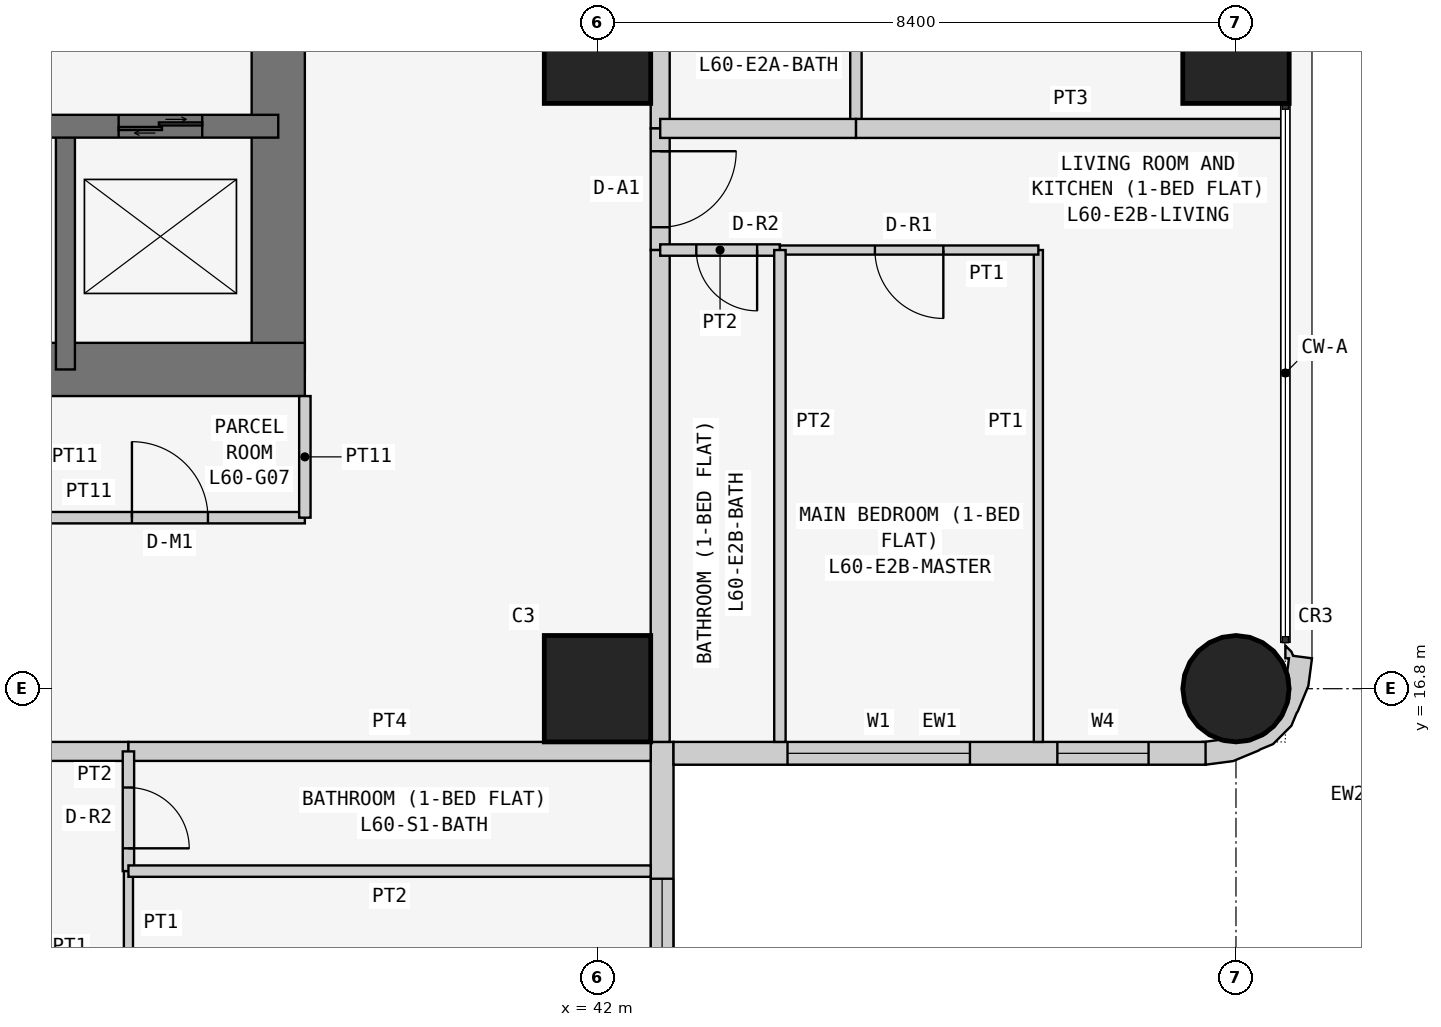
"""IFC4 building model, lengths in metres.
Left out: names, types, materials, properties, quantities, classifications, styles, units other than length and angle.
Written with IfcOpenShell. Run it as: python <this file> out.ifc"""

import sys

from ifc_helpers import new_model, si_unit, direction, frame, frame_2d, origin, origin_2d, place, context, subcontext, project, spatial, polyline, rectangle, circle, outline, extrude, element, fill, save


model = new_model("IFC4")
c1 = context("Model", 3, precision=1e-05, world=origin(), true_north=direction((0.0, 1.0)))
c2 = subcontext(c1, "Body", "Model", "MODEL_VIEW")
j1 = project(units=[si_unit("LENGTHUNIT", "METRE"), si_unit("PLANEANGLEUNIT", "RADIAN")], contexts=[c1])
p1 = place(None, origin())
s1 = spatial("IfcSite", under=j1, at=p1, CompositionType="ELEMENT")
p2 = place(p1, origin())
s2 = spatial("IfcBuilding", under=s1, at=p2, CompositionType="ELEMENT")
p3 = place(p2, frame((0.0, 0.0, 230.1)))
s3 = spatial("IfcBuildingStorey", under=s2, at=p3, CompositionType="ELEMENT", Elevation=230.1)
for number, where, z_axis, x_axis in (
    (1, (42.0, 16.8, 0.0), (0.0, 0.0, 1.0), (1.0, 0.0, 0.0)),
    (2, (42.0, 25.2, 0.0), (0.0, 0.0, 1.0), (1.0, 0.0, 0.0)),
):
    element("IfcColumn", number, at=place(p3, frame(where, z_axis=z_axis, x_axis=x_axis)), inside=s3, PredefinedType="COLUMN", context=c2, shape_type="SweptSolid", body=[
        extrude(rectangle(XDim=1.4, YDim=1.4, at=origin_2d()), origin(), (0.0, 0.0, 1.0), 3.6),
    ])
p4 = place(p3, frame((50.4, 16.8, 0.0), z_axis=(0.0, 0.0, 1.0), x_axis=(1.0, 0.0, 0.0)))
e3 = element("IfcColumn", 3, at=p4, inside=s3, PredefinedType="COLUMN", context=c2, shape_type="SweptSolid", body=[
    extrude(circle(Radius=0.7, at=origin_2d()), origin(), (0.0, 0.0, 1.0), 3.6),
])
p5 = place(p3, frame((50.4, 25.2, 0.0), z_axis=(0.0, 0.0, 1.0), x_axis=(1.0, 0.0, 0.0)))
e4 = element("IfcColumn", 4, at=p5, inside=s3, PredefinedType="COLUMN", context=c2, shape_type="SweptSolid", body=[
    extrude(rectangle(XDim=1.4, YDim=1.4, at=origin_2d()), origin(), (0.0, 0.0, 1.0), 3.6),
])
p6 = place(p3, frame((21.0, 21.0, 0.0), z_axis=(0.0, 0.0, 1.0), x_axis=(1.0, 0.0, 0.0)))
e5 = element("IfcWall", 5, at=p6, inside=s3, PredefinedType="SHEAR", context=c2, shape_type="SweptSolid", body=[
    extrude(rectangle(XDim=17.15, YDim=0.7, at=frame_2d((8.575, 0.0))), origin(), (0.0, 0.0, 1.0), 3.6),
])
p7 = place(p3, frame((37.8, 21.0, 0.0), z_axis=(0.0, 0.0, 1.0), x_axis=(0.0, 1.0, 0.0)))
e6 = element("IfcWall", 6, at=p7, inside=s3, PredefinedType="SHEAR", context=c2, shape_type="SweptSolid", body=[
    extrude(rectangle(XDim=17.15, YDim=0.7, at=frame_2d((8.575, 0.0))), origin(), (0.0, 0.0, 1.0), 3.6),
])
p8 = place(p7, frame((5.2, 0.0, 0.0)))
e7 = element("IfcOpeningElement", 7, at=p8, cuts=e6, PredefinedType="OPENING", context=c2, shape_type="SweptSolid", body=[
    extrude(rectangle(XDim=1.2, YDim=2.1, at=frame_2d((0.6, 1.05))), frame((0.0, 0.36, 0.0), z_axis=(0.0, -1.0, 0.0), x_axis=(1.0, 0.0, 0.0)), (0.0, 0.0, 1.0), 0.72),
])
p9 = place(p3, frame((26.6, 24.2, 0.0), z_axis=(0.0, 0.0, 1.0), x_axis=(1.0, 0.0, 0.0)))
e8 = element("IfcWall", 8, at=p9, inside=s3, PredefinedType="SHEAR", context=c2, shape_type="SweptSolid", body=[
    extrude(rectangle(XDim=11.2, YDim=0.3, at=frame_2d((5.6, 0.0))), origin(), (0.0, 0.0, 1.0), 3.6),
])
p10 = place(p9, frame((0.913, 0.0, 0.0)))
e9 = element("IfcOpeningElement", 9, at=p10, cuts=e8, PredefinedType="OPENING", context=c2, shape_type="SweptSolid", body=[
    extrude(rectangle(XDim=1.0, YDim=2.1, at=frame_2d((0.5, 1.05))), frame((0.0, 0.16, 0.0), z_axis=(0.0, -1.0, 0.0), x_axis=(1.0, 0.0, 0.0)), (0.0, 0.0, 1.0), 0.32),
])
p11 = place(p9, frame((3.75, 0.0, 0.0)))
e10 = element("IfcOpeningElement", 10, at=p11, cuts=e8, PredefinedType="OPENING", context=c2, shape_type="SweptSolid", body=[
    extrude(rectangle(XDim=0.9, YDim=2.1, at=frame_2d((0.45, 1.05))), frame((0.0, 0.16, 0.0), z_axis=(0.0, -1.0, 0.0), x_axis=(1.0, 0.0, 0.0)), (0.0, 0.0, 1.0), 0.32),
])
p12 = place(p9, frame((6.45, 0.0, 0.0)))
e11 = element("IfcOpeningElement", 11, at=p12, cuts=e8, PredefinedType="OPENING", context=c2, shape_type="SweptSolid", body=[
    extrude(rectangle(XDim=1.1, YDim=2.1, at=frame_2d((0.55, 1.05))), frame((0.0, 0.16, 0.0), z_axis=(0.0, -1.0, 0.0), x_axis=(1.0, 0.0, 0.0)), (0.0, 0.0, 1.0), 0.32),
])
p13 = place(p9, frame((9.1, 0.0, 0.0)))
e12 = element("IfcOpeningElement", 12, at=p13, cuts=e8, PredefinedType="OPENING", context=c2, shape_type="SweptSolid", body=[
    extrude(rectangle(XDim=1.1, YDim=2.1, at=frame_2d((0.55, 1.05))), frame((0.0, 0.16, 0.0), z_axis=(0.0, -1.0, 0.0), x_axis=(1.0, 0.0, 0.0)), (0.0, 0.0, 1.0), 0.32),
])
p14 = place(p3, frame((35.0, 21.0, 0.0), z_axis=(0.0, 0.0, 1.0), x_axis=(0.0, 1.0, 0.0)))
e13 = element("IfcWall", 13, at=p14, inside=s3, PredefinedType="SHEAR", context=c2, shape_type="SweptSolid", body=[
    extrude(rectangle(XDim=3.2, YDim=0.25, at=frame_2d((1.6, 0.0))), origin(), (0.0, 0.0, 1.0), 3.6),
])
p15 = place(p3, frame((42.85, 8.8, 0.0), z_axis=(0.0, 0.0, 1.0), x_axis=(0.0, 1.0, 0.0)))
e14 = element("IfcWall", 14, at=p15, inside=s3, PredefinedType="SOLIDWALL", context=c2, shape_type="SweptSolid", body=[
    extrude(rectangle(XDim=7.3, YDim=0.3, at=frame_2d((3.65, 0.0))), origin(), (0.0, 0.0, 1.0), 3.45),
])
p16 = place(p15, frame((3.1, 0.0, 0.9)))
e15 = element("IfcOpeningElement", 15, at=p16, cuts=e14, PredefinedType="OPENING", context=c2, shape_type="SweptSolid", body=[
    extrude(rectangle(XDim=2.4, YDim=1.5, at=frame_2d((1.2, 0.75))), frame((0.0, 0.16, 0.0), z_axis=(0.0, -1.0, 0.0), x_axis=(1.0, 0.0, 0.0)), (0.0, 0.0, 1.0), 0.32),
])
p17 = place(p15, frame((0.75, 0.0, 0.9)))
e16 = element("IfcOpeningElement", 16, at=p17, cuts=e14, PredefinedType="OPENING", context=c2, shape_type="SweptSolid", body=[
    extrude(rectangle(XDim=1.2, YDim=1.5, at=frame_2d((0.6, 0.75))), frame((0.0, 0.16, 0.0), z_axis=(0.0, -1.0, 0.0), x_axis=(1.0, 0.0, 0.0)), (0.0, 0.0, 1.0), 0.32),
])
p18 = place(p3, frame((43.0, 15.95, 0.0), z_axis=(0.0, 0.0, 1.0), x_axis=(1.0, 0.0, 0.0)))
e17 = element("IfcWall", 17, at=p18, inside=s3, PredefinedType="SOLIDWALL", context=c2, shape_type="SweptSolid", body=[
    extrude(rectangle(XDim=7.0, YDim=0.3, at=frame_2d((3.5, 0.0))), origin(), (0.0, 0.0, 1.0), 3.45),
])
p19 = place(p18, frame((1.5, 0.0, 0.9)))
e18 = element("IfcOpeningElement", 18, at=p19, cuts=e17, PredefinedType="OPENING", context=c2, shape_type="SweptSolid", body=[
    extrude(rectangle(XDim=2.4, YDim=1.5, at=frame_2d((1.2, 0.75))), frame((0.0, 0.16, 0.0), z_axis=(0.0, -1.0, 0.0), x_axis=(1.0, 0.0, 0.0)), (0.0, 0.0, 1.0), 0.32),
])
p20 = place(p18, frame((5.05, 0.0, 0.9)))
e19 = element("IfcOpeningElement", 19, at=p20, cuts=e17, PredefinedType="OPENING", context=c2, shape_type="SweptSolid", body=[
    extrude(rectangle(XDim=1.2, YDim=1.5, at=frame_2d((0.6, 0.75))), frame((0.0, 0.16, 0.0), z_axis=(0.0, -1.0, 0.0), x_axis=(1.0, 0.0, 0.0)), (0.0, 0.0, 1.0), 0.32),
])
p21 = place(p3, frame((50.11, 16.076, 0.0), z_axis=(0.0, 0.0, 1.0), x_axis=(0.898030234854, -0.439933741929, 0.0)))
e20 = element("IfcWall", 20, at=p21, inside=s3, PredefinedType="SOLIDWALL", context=c2, shape_type="SweptSolid", body=[
    extrude(outline(polyline([(0.664, 1.577), (0.426, 1.497), (0.382, 1.536), (0.276, 1.572), (0.349, 1.423), (0.392, 1.444), (0.453, 1.261), (0.51, 1.211), (0.632, 0.961), (0.65, 0.683), (0.56, 0.419), (0.375, 0.21), (0.125, 0.087), (0.05, 0.082), (-0.128, -0.035), (-0.145, -0.044), (0.022, -0.296), (0.327, -0.094), (0.568, 0.18), (0.577, 0.199), (0.7, 0.337), (0.811, 0.661), (0.799, 0.846), (0.803, 0.866), (0.78, 1.231), (0.664, 1.577)])), origin(), (0.0, 0.0, 1.0), 3.45),
])
p22 = place(p3, frame((34.6, 19.05, 0.0), z_axis=(0.0, 0.0, 1.0), x_axis=(1.0, 0.0, 0.0)))
e21 = element("IfcWall", 21, at=p22, inside=s3, PredefinedType="PARTITIONING", context=c2, shape_type="SweptSolid", body=[
    extrude(rectangle(XDim=3.55, YDim=0.15, at=frame_2d((1.775, 0.0))), origin(), (0.0, 0.0, 1.0), 3.45),
])
p23 = place(p22, frame((1.275, 0.0, 0.0)))
e22 = element("IfcOpeningElement", 22, at=p23, cuts=e21, PredefinedType="OPENING", context=c2, shape_type="SweptSolid", body=[
    extrude(rectangle(XDim=1.0, YDim=2.1, at=frame_2d((0.5, 1.05))), frame((0.0, 0.085, 0.0), z_axis=(0.0, -1.0, 0.0), x_axis=(1.0, 0.0, 0.0)), (0.0, 0.0, 1.0), 0.17),
])
p24 = place(p3, frame((38.15, 19.05, 0.0), z_axis=(0.0, 0.0, 1.0), x_axis=(0.0, 1.0, 0.0)))
e23 = element("IfcWall", 23, at=p24, inside=s3, PredefinedType="PARTITIONING", context=c2, shape_type="SweptSolid", body=[
    extrude(rectangle(XDim=1.6, YDim=0.15, at=frame_2d((0.8, 0.0))), origin(), (0.0, 0.0, 1.0), 3.45),
])
p25 = place(p3, frame((42.825, 26.8, 0.0), z_axis=(0.0, 0.0, 1.0), x_axis=(0.0, -1.0, 0.0)))
e24 = element("IfcWall", 24, at=p25, inside=s3, PredefinedType="PARTITIONING", context=c2, shape_type="SweptSolid", body=[
    extrude(rectangle(XDim=2.629, YDim=0.25, at=frame_2d((1.314, 0.0))), origin(), (0.0, 0.0, 1.0), 3.45),
])
p26 = place(p3, frame((42.825, 24.171, 0.0), z_axis=(0.0, 0.0, 1.0), x_axis=(0.0, -1.0, 0.0)))
e25 = element("IfcWall", 25, at=p26, inside=s3, PredefinedType="PARTITIONING", context=c2, shape_type="SweptSolid", body=[
    extrude(rectangle(XDim=1.6, YDim=0.25, at=frame_2d((0.8, 0.0))), origin(), (0.0, 0.0, 1.0), 3.45),
])
p27 = place(p26, frame((0.3, 0.0, 0.0)))
e26 = element("IfcOpeningElement", 26, at=p27, cuts=e25, PredefinedType="OPENING", context=c2, shape_type="SweptSolid", body=[
    extrude(rectangle(XDim=1.0, YDim=2.1, at=frame_2d((0.5, 1.05))), frame((0.0, 0.135, 0.0), z_axis=(0.0, -1.0, 0.0), x_axis=(1.0, 0.0, 0.0)), (0.0, 0.0, 1.0), 0.27),
])
p28 = place(p3, frame((42.825, 22.571, 0.0), z_axis=(0.0, 0.0, 1.0), x_axis=(0.0, -1.0, 0.0)))
e27 = element("IfcWall", 27, at=p28, inside=s3, PredefinedType="PARTITIONING", context=c2, shape_type="SweptSolid", body=[
    extrude(rectangle(XDim=6.471, YDim=0.25, at=frame_2d((3.235, 0.0))), origin(), (0.0, 0.0, 1.0), 3.45),
])
p29 = place(p3, frame((35.829, 15.975, 0.0), z_axis=(0.0, 0.0, 1.0), x_axis=(-1.0, 0.0, 0.0)))
e28 = element("IfcWall", 28, at=p29, inside=s3, PredefinedType="PARTITIONING", context=c2, shape_type="SweptSolid", body=[
    extrude(rectangle(XDim=6.429, YDim=0.25, at=frame_2d((3.215, 0.0))), origin(), (0.0, 0.0, 1.0), 3.45),
])
p30 = place(p29, frame((4.929, 0.0, 0.0)))
e29 = element("IfcOpeningElement", 29, at=p30, cuts=e28, PredefinedType="OPENING", context=c2, shape_type="SweptSolid", body=[
    extrude(rectangle(XDim=1.0, YDim=2.1, at=frame_2d((0.5, 1.05))), frame((0.0, 0.135, 0.0), z_axis=(0.0, -1.0, 0.0), x_axis=(1.0, 0.0, 0.0)), (0.0, 0.0, 1.0), 0.27),
])
p31 = place(p3, frame((42.7, 15.975, 0.0), z_axis=(0.0, 0.0, 1.0), x_axis=(-1.0, 0.0, 0.0)))
e30 = element("IfcWall", 30, at=p31, inside=s3, PredefinedType="PARTITIONING", context=c2, shape_type="SweptSolid", body=[
    extrude(rectangle(XDim=6.871, YDim=0.25, at=frame_2d((3.436, 0.0))), origin(), (0.0, 0.0, 1.0), 3.45),
])
p32 = place(p3, frame((45.4, 24.171, 0.0), z_axis=(0.0, 0.0, 1.0), x_axis=(0.0, 1.0, 0.0)))
e31 = element("IfcWall", 31, at=p32, inside=s3, PredefinedType="PARTITIONING", context=c2, shape_type="SweptSolid", body=[
    extrude(rectangle(XDim=2.629, YDim=0.15, at=frame_2d((1.314, 0.0))), origin(), (0.0, 0.0, 1.0), 3.45),
])
p33 = place(p3, frame((51.05, 24.171, 0.0), z_axis=(0.0, 0.0, 1.0), x_axis=(-1.0, 0.0, 0.0)))
e32 = element("IfcWall", 32, at=p33, inside=s3, PredefinedType="PARTITIONING", context=c2, shape_type="SweptSolid", body=[
    extrude(rectangle(XDim=5.65, YDim=0.25, at=frame_2d((2.825, 0.0))), origin(), (0.0, 0.0, 1.0), 3.45),
])
p34 = place(p3, frame((45.4, 24.171, 0.0), z_axis=(0.0, 0.0, 1.0), x_axis=(-1.0, 0.0, 0.0)))
e33 = element("IfcWall", 33, at=p34, inside=s3, PredefinedType="PARTITIONING", context=c2, shape_type="SweptSolid", body=[
    extrude(rectangle(XDim=2.575, YDim=0.25, at=frame_2d((1.288, 0.0))), origin(), (0.0, 0.0, 1.0), 3.45),
])
p35 = place(p3, frame((44.4, 22.571, 0.0), z_axis=(0.0, 0.0, 1.0), x_axis=(-1.0, 0.0, 0.0)))
e34 = element("IfcWall", 34, at=p35, inside=s3, PredefinedType="PARTITIONING", context=c2, shape_type="SweptSolid", body=[
    extrude(rectangle(XDim=1.575, YDim=0.15, at=frame_2d((0.788, 0.0))), origin(), (0.0, 0.0, 1.0), 3.45),
])
p36 = place(p35, frame((0.3, 0.0, 0.0)))
e35 = element("IfcOpeningElement", 35, at=p36, cuts=e34, PredefinedType="OPENING", context=c2, shape_type="SweptSolid", body=[
    extrude(rectangle(XDim=0.8, YDim=2.1, at=frame_2d((0.4, 1.05))), frame((0.0, 0.085, 0.0), z_axis=(0.0, -1.0, 0.0), x_axis=(1.0, 0.0, 0.0)), (0.0, 0.0, 1.0), 0.17),
])
p37 = place(p3, frame((47.8, 16.1, 0.0), z_axis=(0.0, 0.0, 1.0), x_axis=(0.0, 1.0, 0.0)))
e36 = element("IfcWall", 36, at=p37, inside=s3, PredefinedType="PARTITIONING", context=c2, shape_type="SweptSolid", body=[
    extrude(rectangle(XDim=6.471, YDim=0.12, at=frame_2d((3.235, 0.0))), origin(), (0.0, 0.0, 1.0), 3.45),
])
p38 = place(p3, frame((47.8, 22.571, 0.0), z_axis=(0.0, 0.0, 1.0), x_axis=(-1.0, 0.0, 0.0)))
e37 = element("IfcWall", 37, at=p38, inside=s3, PredefinedType="PARTITIONING", context=c2, shape_type="SweptSolid", body=[
    extrude(rectangle(XDim=3.4, YDim=0.12, at=frame_2d((1.7, 0.0))), origin(), (0.0, 0.0, 1.0), 3.45),
])
p39 = place(p38, frame((1.25, 0.0, 0.0)))
e38 = element("IfcOpeningElement", 38, at=p39, cuts=e37, PredefinedType="OPENING", context=c2, shape_type="SweptSolid", body=[
    extrude(rectangle(XDim=0.9, YDim=2.1, at=frame_2d((0.45, 1.05))), frame((0.0, 0.07, 0.0), z_axis=(0.0, -1.0, 0.0), x_axis=(1.0, 0.0, 0.0)), (0.0, 0.0, 1.0), 0.14),
])
p40 = place(p3, frame((44.4, 22.571, 0.0), z_axis=(0.0, 0.0, 1.0), x_axis=(0.0, -1.0, 0.0)))
e39 = element("IfcWall", 39, at=p40, inside=s3, PredefinedType="PARTITIONING", context=c2, shape_type="SweptSolid", body=[
    extrude(rectangle(XDim=6.471, YDim=0.15, at=frame_2d((3.235, 0.0))), origin(), (0.0, 0.0, 1.0), 3.45),
])
p41 = place(p3, frame((35.829, 15.975, 0.0), z_axis=(0.0, 0.0, 1.0), x_axis=(0.0, -1.0, 0.0)))
e40 = element("IfcWall", 40, at=p41, inside=s3, PredefinedType="PARTITIONING", context=c2, shape_type="SweptSolid", body=[
    extrude(rectangle(XDim=1.575, YDim=0.15, at=frame_2d((0.788, 0.0))), origin(), (0.0, 0.0, 1.0), 3.45),
])
p42 = place(p41, frame((0.475, 0.0, 0.0)))
e41 = element("IfcOpeningElement", 41, at=p42, cuts=e40, PredefinedType="OPENING", context=c2, shape_type="SweptSolid", body=[
    extrude(rectangle(XDim=0.8, YDim=2.1, at=frame_2d((0.4, 1.05))), frame((0.0, 0.085, 0.0), z_axis=(0.0, -1.0, 0.0), x_axis=(1.0, 0.0, 0.0)), (0.0, 0.0, 1.0), 0.17),
])
p43 = place(p3, frame((35.829, 14.4, 0.0), z_axis=(0.0, 0.0, 1.0), x_axis=(0.0, -1.0, 0.0)))
e42 = element("IfcWall", 42, at=p43, inside=s3, PredefinedType="PARTITIONING", context=c2, shape_type="SweptSolid", body=[
    extrude(rectangle(XDim=3.4, YDim=0.12, at=frame_2d((1.7, 0.0))), origin(), (0.0, 0.0, 1.0), 3.45),
])
p44 = place(p43, frame((1.25, 0.0, 0.0)))
e43 = element("IfcOpeningElement", 43, at=p44, cuts=e42, PredefinedType="OPENING", context=c2, shape_type="SweptSolid", body=[
    extrude(rectangle(XDim=0.9, YDim=2.1, at=frame_2d((0.45, 1.05))), frame((0.0, 0.07, 0.0), z_axis=(0.0, -1.0, 0.0), x_axis=(1.0, 0.0, 0.0)), (0.0, 0.0, 1.0), 0.14),
])
p45 = place(p3, frame((35.829, 14.4, 0.0), z_axis=(0.0, 0.0, 1.0), x_axis=(1.0, 0.0, 0.0)))
e44 = element("IfcWall", 44, at=p45, inside=s3, PredefinedType="PARTITIONING", context=c2, shape_type="SweptSolid", body=[
    extrude(rectangle(XDim=6.871, YDim=0.15, at=frame_2d((3.436, 0.0))), origin(), (0.0, 0.0, 1.0), 3.45),
])
p46 = place(p19, origin())
e45 = element("IfcWindow", 45, at=p46, inside=s3, PartitioningType="SINGLE_PANEL", PredefinedType="WINDOW", context=c2, shape_type="SweptSolid", body=[
    extrude(rectangle(XDim=2.4, YDim=1.5, at=frame_2d((1.2, 0.75))), frame((0.0, 0.03, 0.0), z_axis=(0.0, -1.0, 0.0), x_axis=(1.0, 0.0, 0.0)), (0.0, 0.0, 1.0), 0.06),
])
fill(e18, e45)
p47 = place(p20, origin())
e46 = element("IfcWindow", 46, at=p47, inside=s3, PartitioningType="SINGLE_PANEL", PredefinedType="WINDOW", context=c2, shape_type="SweptSolid", body=[
    extrude(rectangle(XDim=1.2, YDim=1.5, at=frame_2d((0.6, 0.75))), frame((0.0, 0.03, 0.0), z_axis=(0.0, -1.0, 0.0), x_axis=(1.0, 0.0, 0.0)), (0.0, 0.0, 1.0), 0.06),
])
fill(e19, e46)
p48 = place(p16, origin())
e47 = element("IfcWindow", 47, at=p48, inside=s3, PartitioningType="SINGLE_PANEL", PredefinedType="WINDOW", context=c2, shape_type="SweptSolid", body=[
    extrude(rectangle(XDim=2.4, YDim=1.5, at=frame_2d((1.2, 0.75))), frame((0.0, 0.03, 0.0), z_axis=(0.0, -1.0, 0.0), x_axis=(1.0, 0.0, 0.0)), (0.0, 0.0, 1.0), 0.06),
])
fill(e15, e47)
p49 = place(p23, origin())
e48 = element("IfcDoor", 48, at=p49, inside=s3, OperationType="SINGLE_SWING_LEFT", PredefinedType="DOOR", context=c2, shape_type="SweptSolid", body=[
    extrude(rectangle(XDim=1.0, YDim=2.1, at=frame_2d((0.5, 1.05))), frame((0.0, 0.025, 0.0), z_axis=(0.0, -1.0, 0.0), x_axis=(1.0, 0.0, 0.0)), (0.0, 0.0, 1.0), 0.05),
])
fill(e22, e48)
p50 = place(p27, origin())
e49 = element("IfcDoor", 49, at=p50, inside=s3, OperationType="SINGLE_SWING_LEFT", PredefinedType="DOOR", context=c2, shape_type="SweptSolid", body=[
    extrude(rectangle(XDim=1.0, YDim=2.1, at=frame_2d((0.5, 1.05))), frame((0.0, 0.025, 0.0), z_axis=(0.0, -1.0, 0.0), x_axis=(1.0, 0.0, 0.0)), (0.0, 0.0, 1.0), 0.05),
])
fill(e26, e49)
p51 = place(p36, origin())
e50 = element("IfcDoor", 50, at=p51, inside=s3, OperationType="SINGLE_SWING_LEFT", PredefinedType="DOOR", context=c2, shape_type="SweptSolid", body=[
    extrude(rectangle(XDim=0.8, YDim=2.1, at=frame_2d((0.4, 1.05))), frame((0.0, 0.025, 0.0), z_axis=(0.0, -1.0, 0.0), x_axis=(1.0, 0.0, 0.0)), (0.0, 0.0, 1.0), 0.05),
])
fill(e35, e50)
p52 = place(p39, origin())
e51 = element("IfcDoor", 51, at=p52, inside=s3, OperationType="SINGLE_SWING_LEFT", PredefinedType="DOOR", context=c2, shape_type="SweptSolid", body=[
    extrude(rectangle(XDim=0.9, YDim=2.1, at=frame_2d((0.45, 1.05))), frame((0.0, 0.025, 0.0), z_axis=(0.0, -1.0, 0.0), x_axis=(1.0, 0.0, 0.0)), (0.0, 0.0, 1.0), 0.05),
])
fill(e38, e51)
p53 = place(p42, origin())
e52 = element("IfcDoor", 52, at=p53, inside=s3, OperationType="SINGLE_SWING_RIGHT", PredefinedType="DOOR", context=c2, shape_type="SweptSolid", body=[
    extrude(rectangle(XDim=0.8, YDim=2.1, at=frame_2d((0.4, 1.05))), frame((0.0, 0.025, 0.0), z_axis=(0.0, -1.0, 0.0), x_axis=(1.0, 0.0, 0.0)), (0.0, 0.0, 1.0), 0.05),
])
fill(e41, e52)
p54 = place(p13, origin())
e53 = element("IfcDoor", 53, at=p54, inside=s3, OperationType="DOUBLE_DOOR_SLIDING", PredefinedType="DOOR", context=c2, shape_type="SweptSolid", body=[
    extrude(rectangle(XDim=1.1, YDim=2.1, at=frame_2d((0.55, 1.05))), frame((0.0, 0.025, 0.0), z_axis=(0.0, -1.0, 0.0), x_axis=(1.0, 0.0, 0.0)), (0.0, 0.0, 1.0), 0.05),
])
fill(e12, e53)
save(model, sys.argv[1])
